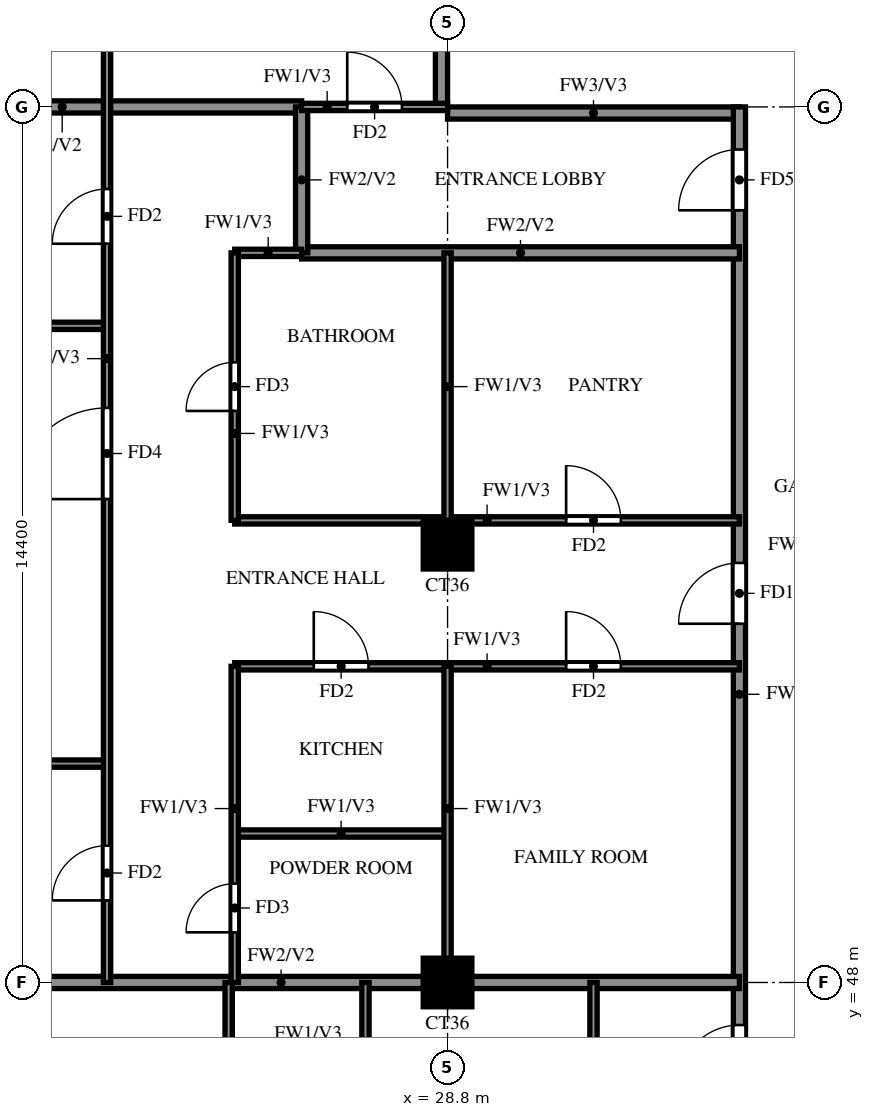
"""IFC4 building model, lengths in metres.
Left out: names, types, materials, properties, quantities, classifications, styles, units other than length and angle.
Written with IfcOpenShell. Run it as: python <this file> out.ifc"""

import sys

from ifc_helpers import new_model, si_unit, direction, frame, frame_2d, origin, origin_2d, place, context, subcontext, project, spatial, rectangle, extrude, source, transform, mapped, element, fill, save


model = new_model("IFC4")
c1 = context("Model", 3, precision=1e-05, world=origin(), true_north=direction((0.0, 1.0)))
c2 = subcontext(c1, "Body", "Model", "MODEL_VIEW")
j1 = project(units=[si_unit("LENGTHUNIT", "METRE"), si_unit("PLANEANGLEUNIT", "RADIAN")], contexts=[c1])
p1 = place(None, origin())
s1 = spatial("IfcSite", under=j1, at=p1, CompositionType="ELEMENT")
p2 = place(p1, origin())
s2 = spatial("IfcBuilding", under=s1, at=p2, CompositionType="ELEMENT")
p3 = place(p2, frame((0.0, 0.0, 243.0)))
s3 = spatial("IfcBuildingStorey", under=s2, at=p3, CompositionType="ELEMENT", Elevation=243.0)
m1 = source(origin(), c2, "Body", "SweptSolid", [
    extrude(rectangle(XDim=0.8, YDim=0.8, at=origin_2d()), origin(), (0.0, 0.0, 1.0), 3.22),
])
for number, where, z_axis, x_axis in (
    (1, (28.8, 48.0, 0.0), (0.0, 0.0, 1.0), (1.0, 0.0, 0.0)),
    (2, (28.8, 55.2, 0.0), (0.0, 0.0, 1.0), (1.0, 0.0, 0.0)),
):
    element("IfcColumn", number, at=place(p3, frame(where, z_axis=z_axis, x_axis=x_axis)), inside=s3, PredefinedType="COLUMN", context=c2, shape_type="MappedRepresentation", body=[
        mapped(m1, transform((0.0, 0.0, 0.0))),
    ])
p4 = place(p3, frame((28.8, 62.3, 0.0), z_axis=(0.0, 0.0, 1.0), x_axis=(1.0, 0.0, 0.0)))
e3 = element("IfcWall", 3, at=p4, inside=s3, PredefinedType="SOLIDWALL", context=c2, shape_type="SweptSolid", body=[
    extrude(rectangle(XDim=4.8, YDim=0.2, at=frame_2d((2.4, 0.0))), origin(), (0.0, 0.0, 1.0), 3.22),
])
p5 = place(p3, frame((28.7, 62.4, 0.0), z_axis=(0.0, 0.0, 1.0), x_axis=(0.0, 1.0, 0.0)))
e4 = element("IfcWall", 4, at=p5, inside=s3, PredefinedType="SOLIDWALL", context=c2, shape_type="SweptSolid", body=[
    extrude(rectangle(XDim=15.6, YDim=0.2, at=frame_2d((7.8, 0.0))), origin(), (0.0, 0.0, 1.0), 3.22),
])
p6 = place(p3, frame((33.6, 45.6, 0.0), z_axis=(0.0, 0.0, 1.0), x_axis=(0.0, 1.0, 0.0)))
e5 = element("IfcWall", 5, at=p6, inside=s3, PredefinedType="SOLIDWALL", context=c2, shape_type="SweptSolid", body=[
    extrude(rectangle(XDim=16.8, YDim=0.2, at=frame_2d((8.4, 0.0))), origin(), (0.0, 0.0, 1.0), 3.22),
])
p7 = place(p6, frame((0.7, 0.0, 0.0)))
e6 = element("IfcOpeningElement", 6, at=p7, cuts=e5, PredefinedType="OPENING", context=c2, shape_type="SweptSolid", body=[
    extrude(rectangle(XDim=1.0, YDim=2.1, at=frame_2d((0.5, 1.05))), frame((0.0, 0.11, 0.0), z_axis=(0.0, -1.0, 0.0), x_axis=(1.0, 0.0, 0.0)), (0.0, 0.0, 1.0), 0.22),
])
p8 = place(p6, frame((8.3, 0.0, 0.0)))
e7 = element("IfcOpeningElement", 7, at=p8, cuts=e5, PredefinedType="OPENING", context=c2, shape_type="SweptSolid", body=[
    extrude(rectangle(XDim=1.0, YDim=2.1, at=frame_2d((0.5, 1.05))), frame((0.0, 0.11, 0.0), z_axis=(0.0, -1.0, 0.0), x_axis=(1.0, 0.0, 0.0)), (0.0, 0.0, 1.0), 0.22),
])
p9 = place(p6, frame((15.1, 0.0, 0.0)))
e8 = element("IfcOpeningElement", 8, at=p9, cuts=e5, PredefinedType="OPENING", context=c2, shape_type="SweptSolid", body=[
    extrude(rectangle(XDim=1.0, YDim=2.1, at=frame_2d((0.5, 1.05))), frame((0.0, 0.11, 0.0), z_axis=(0.0, -1.0, 0.0), x_axis=(1.0, 0.0, 0.0)), (0.0, 0.0, 1.0), 0.22),
])
p10 = place(p3, frame((18.525, 48.0, 0.0), z_axis=(0.0, 0.0, 1.0), x_axis=(1.0, 0.0, 0.0)))
e9 = element("IfcWall", 9, at=p10, inside=s3, PredefinedType="SOLIDWALL", context=c2, shape_type="SweptSolid", body=[
    extrude(rectangle(XDim=15.075, YDim=0.2, at=frame_2d((7.538, 0.0))), origin(), (0.0, 0.0, 1.0), 3.22),
])
p11 = place(p3, frame((26.4, 60.0, 0.0), z_axis=(0.0, 0.0, 1.0), x_axis=(1.0, 0.0, 0.0)))
e10 = element("IfcWall", 10, at=p11, inside=s3, PredefinedType="SOLIDWALL", context=c2, shape_type="SweptSolid", body=[
    extrude(rectangle(XDim=7.2, YDim=0.2, at=frame_2d((3.6, 0.0))), origin(), (0.0, 0.0, 1.0), 3.22),
])
p12 = place(p3, frame((18.525, 62.4, 0.0), z_axis=(0.0, 0.0, 1.0), x_axis=(1.0, 0.0, 0.0)))
e11 = element("IfcWall", 11, at=p12, inside=s3, PredefinedType="SOLIDWALL", context=c2, shape_type="SweptSolid", body=[
    extrude(rectangle(XDim=7.875, YDim=0.2, at=frame_2d((3.938, 0.0))), origin(), (0.0, 0.0, 1.0), 3.22),
])
p13 = place(p3, frame((26.4, 60.0, 0.0), z_axis=(0.0, 0.0, 1.0), x_axis=(0.0, 1.0, 0.0)))
e12 = element("IfcWall", 12, at=p13, inside=s3, PredefinedType="SOLIDWALL", context=c2, shape_type="SweptSolid", body=[
    extrude(rectangle(XDim=2.4, YDim=0.2, at=frame_2d((1.2, 0.0))), origin(), (0.0, 0.0, 1.0), 3.22),
])
p14 = place(p3, frame((25.3, 50.45, 0.0), z_axis=(0.0, 0.0, 1.0), x_axis=(1.0, 0.0, 0.0)))
e13 = element("IfcWall", 13, at=p14, inside=s3, PredefinedType="PARTITIONING", context=c2, shape_type="SweptSolid", body=[
    extrude(rectangle(XDim=3.5, YDim=0.12, at=frame_2d((1.75, 0.0))), origin(), (0.0, 0.0, 1.0), 3.22),
])
p15 = place(p3, frame((18.525, 51.6, 0.0), z_axis=(0.0, 0.0, 1.0), x_axis=(1.0, 0.0, 0.0)))
e14 = element("IfcWall", 14, at=p15, inside=s3, PredefinedType="PARTITIONING", context=c2, shape_type="SweptSolid", body=[
    extrude(rectangle(XDim=4.675, YDim=0.12, at=frame_2d((2.337, 0.0))), origin(), (0.0, 0.0, 1.0), 2.32),
])
p16 = place(p3, frame((25.3, 53.2, 0.0), z_axis=(0.0, 0.0, 1.0), x_axis=(1.0, 0.0, 0.0)))
e15 = element("IfcWall", 15, at=p16, inside=s3, PredefinedType="PARTITIONING", context=c2, shape_type="SweptSolid", body=[
    extrude(rectangle(XDim=8.3, YDim=0.12, at=frame_2d((4.15, 0.0))), origin(), (0.0, 0.0, 1.0), 3.22),
])
p17 = place(p16, frame((1.3, 0.0, 0.0)))
e16 = element("IfcOpeningElement", 16, at=p17, cuts=e15, PredefinedType="OPENING", context=c2, shape_type="SweptSolid", body=[
    extrude(rectangle(XDim=0.9, YDim=2.1, at=frame_2d((0.45, 1.05))), frame((0.0, 0.07, 0.0), z_axis=(0.0, -1.0, 0.0), x_axis=(1.0, 0.0, 0.0)), (0.0, 0.0, 1.0), 0.14),
])
p18 = place(p16, frame((5.45, 0.0, 0.0)))
e17 = element("IfcOpeningElement", 17, at=p18, cuts=e15, PredefinedType="OPENING", context=c2, shape_type="SweptSolid", body=[
    extrude(rectangle(XDim=0.9, YDim=2.1, at=frame_2d((0.45, 1.05))), frame((0.0, 0.07, 0.0), z_axis=(0.0, -1.0, 0.0), x_axis=(1.0, 0.0, 0.0)), (0.0, 0.0, 1.0), 0.14),
])
p19 = place(p3, frame((25.3, 55.6, 0.0), z_axis=(0.0, 0.0, 1.0), x_axis=(1.0, 0.0, 0.0)))
e18 = element("IfcWall", 18, at=p19, inside=s3, PredefinedType="PARTITIONING", context=c2, shape_type="SweptSolid", body=[
    extrude(rectangle(XDim=8.3, YDim=0.12, at=frame_2d((4.15, 0.0))), origin(), (0.0, 0.0, 1.0), 3.22),
])
p20 = place(p19, frame((5.45, 0.0, 0.0)))
e19 = element("IfcOpeningElement", 19, at=p20, cuts=e18, PredefinedType="OPENING", context=c2, shape_type="SweptSolid", body=[
    extrude(rectangle(XDim=0.9, YDim=2.1, at=frame_2d((0.45, 1.05))), frame((0.0, 0.07, 0.0), z_axis=(0.0, -1.0, 0.0), x_axis=(1.0, 0.0, 0.0)), (0.0, 0.0, 1.0), 0.14),
])
p21 = place(p3, frame((18.525, 58.8, 0.0), z_axis=(0.0, 0.0, 1.0), x_axis=(1.0, 0.0, 0.0)))
e20 = element("IfcWall", 20, at=p21, inside=s3, PredefinedType="PARTITIONING", context=c2, shape_type="SweptSolid", body=[
    extrude(rectangle(XDim=4.675, YDim=0.12, at=frame_2d((2.337, 0.0))), origin(), (0.0, 0.0, 1.0), 2.32),
])
p22 = place(p3, frame((25.3, 60.0, 0.0), z_axis=(0.0, 0.0, 1.0), x_axis=(1.0, 0.0, 0.0)))
e21 = element("IfcWall", 21, at=p22, inside=s3, PredefinedType="PARTITIONING", context=c2, shape_type="SweptSolid", body=[
    extrude(rectangle(XDim=1.1, YDim=0.12, at=frame_2d((0.55, 0.0))), origin(), (0.0, 0.0, 1.0), 3.22),
])
p23 = place(p3, frame((26.4, 62.4, 0.0), z_axis=(0.0, 0.0, 1.0), x_axis=(1.0, 0.0, 0.0)))
e22 = element("IfcWall", 22, at=p23, inside=s3, PredefinedType="PARTITIONING", context=c2, shape_type="SweptSolid", body=[
    extrude(rectangle(XDim=2.4, YDim=0.12, at=frame_2d((1.2, 0.0))), origin(), (0.0, 0.0, 1.0), 3.22),
])
p24 = place(p23, frame((0.75, 0.0, 0.0)))
e23 = element("IfcOpeningElement", 23, at=p24, cuts=e22, PredefinedType="OPENING", context=c2, shape_type="SweptSolid", body=[
    extrude(rectangle(XDim=0.9, YDim=2.1, at=frame_2d((0.45, 1.05))), frame((0.0, 0.07, 0.0), z_axis=(0.0, -1.0, 0.0), x_axis=(1.0, 0.0, 0.0)), (0.0, 0.0, 1.0), 0.14),
])
p25 = place(p3, frame((23.2, 48.0, 0.0), z_axis=(0.0, 0.0, 1.0), x_axis=(0.0, 1.0, 0.0)))
e24 = element("IfcWall", 24, at=p25, inside=s3, PredefinedType="PARTITIONING", context=c2, shape_type="SweptSolid", body=[
    extrude(rectangle(XDim=21.6, YDim=0.12, at=frame_2d((10.8, 0.0))), origin(), (0.0, 0.0, 1.0), 3.22),
])
p26 = place(p25, frame((1.35, 0.0, 0.0)))
e25 = element("IfcOpeningElement", 25, at=p26, cuts=e24, PredefinedType="OPENING", context=c2, shape_type="SweptSolid", body=[
    extrude(rectangle(XDim=0.9, YDim=2.1, at=frame_2d((0.45, 1.05))), frame((0.0, 0.07, 0.0), z_axis=(0.0, -1.0, 0.0), x_axis=(1.0, 0.0, 0.0)), (0.0, 0.0, 1.0), 0.14),
])
p27 = place(p25, frame((7.95, 0.0, 0.0)))
e26 = element("IfcOpeningElement", 26, at=p27, cuts=e24, PredefinedType="OPENING", context=c2, shape_type="SweptSolid", body=[
    extrude(rectangle(XDim=1.5, YDim=2.1, at=frame_2d((0.75, 1.05))), frame((0.0, 0.07, 0.0), z_axis=(0.0, -1.0, 0.0), x_axis=(1.0, 0.0, 0.0)), (0.0, 0.0, 1.0), 0.14),
])
p28 = place(p25, frame((12.15, 0.0, 0.0)))
e27 = element("IfcOpeningElement", 27, at=p28, cuts=e24, PredefinedType="OPENING", context=c2, shape_type="SweptSolid", body=[
    extrude(rectangle(XDim=0.9, YDim=2.1, at=frame_2d((0.45, 1.05))), frame((0.0, 0.07, 0.0), z_axis=(0.0, -1.0, 0.0), x_axis=(1.0, 0.0, 0.0)), (0.0, 0.0, 1.0), 0.14),
])
p29 = place(p25, frame((15.75, 0.0, 0.0)))
e28 = element("IfcOpeningElement", 28, at=p29, cuts=e24, PredefinedType="OPENING", context=c2, shape_type="SweptSolid", body=[
    extrude(rectangle(XDim=0.9, YDim=2.1, at=frame_2d((0.45, 1.05))), frame((0.0, 0.07, 0.0), z_axis=(0.0, -1.0, 0.0), x_axis=(1.0, 0.0, 0.0)), (0.0, 0.0, 1.0), 0.14),
])
p30 = place(p25, frame((19.35, 0.0, 0.0)))
e29 = element("IfcOpeningElement", 29, at=p30, cuts=e24, PredefinedType="OPENING", context=c2, shape_type="SweptSolid", body=[
    extrude(rectangle(XDim=0.9, YDim=2.1, at=frame_2d((0.45, 1.05))), frame((0.0, 0.07, 0.0), z_axis=(0.0, -1.0, 0.0), x_axis=(1.0, 0.0, 0.0)), (0.0, 0.0, 1.0), 0.14),
])
p31 = place(p3, frame((25.2, 39.725, 0.0), z_axis=(0.0, 0.0, 1.0), x_axis=(0.0, 1.0, 0.0)))
e30 = element("IfcWall", 30, at=p31, inside=s3, PredefinedType="PARTITIONING", context=c2, shape_type="SweptSolid", body=[
    extrude(rectangle(XDim=8.275, YDim=0.12, at=frame_2d((4.137, 0.0))), origin(), (0.0, 0.0, 1.0), 3.22),
])
p32 = place(p31, frame((4.525, 0.0, 0.0)))
e31 = element("IfcOpeningElement", 31, at=p32, cuts=e30, PredefinedType="OPENING", context=c2, shape_type="SweptSolid", body=[
    extrude(rectangle(XDim=0.9, YDim=2.1, at=frame_2d((0.45, 1.05))), frame((0.0, 0.07, 0.0), z_axis=(0.0, -1.0, 0.0), x_axis=(1.0, 0.0, 0.0)), (0.0, 0.0, 1.0), 0.14),
])
p33 = place(p3, frame((25.3, 48.0, 0.0), z_axis=(0.0, 0.0, 1.0), x_axis=(0.0, 1.0, 0.0)))
e32 = element("IfcWall", 32, at=p33, inside=s3, PredefinedType="PARTITIONING", context=c2, shape_type="SweptSolid", body=[
    extrude(rectangle(XDim=5.2, YDim=0.12, at=frame_2d((2.6, 0.0))), origin(), (0.0, 0.0, 1.0), 3.22),
])
p34 = place(p33, frame((0.825, 0.0, 0.0)))
e33 = element("IfcOpeningElement", 33, at=p34, cuts=e32, PredefinedType="OPENING", context=c2, shape_type="SweptSolid", body=[
    extrude(rectangle(XDim=0.8, YDim=2.1, at=frame_2d((0.4, 1.05))), frame((0.0, 0.07, 0.0), z_axis=(0.0, -1.0, 0.0), x_axis=(1.0, 0.0, 0.0)), (0.0, 0.0, 1.0), 0.14),
])
p35 = place(p3, frame((25.3, 55.6, 0.0), z_axis=(0.0, 0.0, 1.0), x_axis=(0.0, 1.0, 0.0)))
e34 = element("IfcWall", 34, at=p35, inside=s3, PredefinedType="PARTITIONING", context=c2, shape_type="SweptSolid", body=[
    extrude(rectangle(XDim=4.4, YDim=0.12, at=frame_2d((2.2, 0.0))), origin(), (0.0, 0.0, 1.0), 3.22),
])
p36 = place(p35, frame((1.8, 0.0, 0.0)))
e35 = element("IfcOpeningElement", 35, at=p36, cuts=e34, PredefinedType="OPENING", context=c2, shape_type="SweptSolid", body=[
    extrude(rectangle(XDim=0.8, YDim=2.1, at=frame_2d((0.4, 1.05))), frame((0.0, 0.07, 0.0), z_axis=(0.0, -1.0, 0.0), x_axis=(1.0, 0.0, 0.0)), (0.0, 0.0, 1.0), 0.14),
])
p37 = place(p3, frame((27.45, 45.6, 0.0), z_axis=(0.0, 0.0, 1.0), x_axis=(0.0, 1.0, 0.0)))
e36 = element("IfcWall", 36, at=p37, inside=s3, PredefinedType="PARTITIONING", context=c2, shape_type="SweptSolid", body=[
    extrude(rectangle(XDim=2.4, YDim=0.12, at=frame_2d((1.2, 0.0))), origin(), (0.0, 0.0, 1.0), 3.22),
])
p38 = place(p3, frame((28.8, 48.0, 0.0), z_axis=(0.0, 0.0, 1.0), x_axis=(0.0, 1.0, 0.0)))
e37 = element("IfcWall", 37, at=p38, inside=s3, PredefinedType="PARTITIONING", context=c2, shape_type="SweptSolid", body=[
    extrude(rectangle(XDim=5.2, YDim=0.12, at=frame_2d((2.6, 0.0))), origin(), (0.0, 0.0, 1.0), 3.22),
])
p39 = place(p3, frame((28.8, 55.6, 0.0), z_axis=(0.0, 0.0, 1.0), x_axis=(0.0, 1.0, 0.0)))
e38 = element("IfcWall", 38, at=p39, inside=s3, PredefinedType="PARTITIONING", context=c2, shape_type="SweptSolid", body=[
    extrude(rectangle(XDim=4.4, YDim=0.12, at=frame_2d((2.2, 0.0))), origin(), (0.0, 0.0, 1.0), 3.22),
])
p40 = place(p3, frame((31.2, 45.6, 0.0), z_axis=(0.0, 0.0, 1.0), x_axis=(0.0, 1.0, 0.0)))
e39 = element("IfcWall", 39, at=p40, inside=s3, PredefinedType="PARTITIONING", context=c2, shape_type="SweptSolid", body=[
    extrude(rectangle(XDim=2.4, YDim=0.12, at=frame_2d((1.2, 0.0))), origin(), (0.0, 0.0, 1.0), 3.22),
])
p41 = place(p7, origin())
e40 = element("IfcDoor", 40, at=p41, inside=s3, OperationType="SINGLE_SWING_LEFT", PredefinedType="DOOR", context=c2, shape_type="SweptSolid", body=[
    extrude(rectangle(XDim=1.0, YDim=2.1, at=frame_2d((0.5, 1.05))), frame((0.0, 0.025, 0.0), z_axis=(0.0, -1.0, 0.0), x_axis=(1.0, 0.0, 0.0)), (0.0, 0.0, 1.0), 0.05),
])
fill(e6, e40)
p42 = place(p8, origin())
e41 = element("IfcDoor", 41, at=p42, inside=s3, OperationType="SINGLE_SWING_RIGHT", PredefinedType="DOOR", context=c2, shape_type="SweptSolid", body=[
    extrude(rectangle(XDim=1.0, YDim=2.1, at=frame_2d((0.5, 1.05))), frame((0.0, 0.025, 0.0), z_axis=(0.0, -1.0, 0.0), x_axis=(1.0, 0.0, 0.0)), (0.0, 0.0, 1.0), 0.05),
])
fill(e7, e41)
p43 = place(p26, origin())
e42 = element("IfcDoor", 42, at=p43, inside=s3, OperationType="SINGLE_SWING_LEFT", PredefinedType="DOOR", context=c2, shape_type="SweptSolid", body=[
    extrude(rectangle(XDim=0.9, YDim=2.1, at=frame_2d((0.45, 1.05))), frame((0.0, 0.025, 0.0), z_axis=(0.0, -1.0, 0.0), x_axis=(1.0, 0.0, 0.0)), (0.0, 0.0, 1.0), 0.05),
])
fill(e25, e42)
p44 = place(p27, origin())
e43 = element("IfcDoor", 43, at=p44, inside=s3, OperationType="SINGLE_SWING_RIGHT", PredefinedType="DOOR", context=c2, shape_type="SweptSolid", body=[
    extrude(rectangle(XDim=1.5, YDim=2.1, at=frame_2d((0.75, 1.05))), frame((0.0, 0.025, 0.0), z_axis=(0.0, -1.0, 0.0), x_axis=(1.0, 0.0, 0.0)), (0.0, 0.0, 1.0), 0.05),
])
fill(e26, e43)
p45 = place(p28, origin())
e44 = element("IfcDoor", 44, at=p45, inside=s3, OperationType="SINGLE_SWING_RIGHT", PredefinedType="DOOR", context=c2, shape_type="SweptSolid", body=[
    extrude(rectangle(XDim=0.9, YDim=2.1, at=frame_2d((0.45, 1.05))), frame((0.0, 0.025, 0.0), z_axis=(0.0, -1.0, 0.0), x_axis=(1.0, 0.0, 0.0)), (0.0, 0.0, 1.0), 0.05),
])
fill(e27, e44)
p46 = place(p34, origin())
e45 = element("IfcDoor", 45, at=p46, inside=s3, OperationType="SINGLE_SWING_LEFT", PredefinedType="DOOR", context=c2, shape_type="SweptSolid", body=[
    extrude(rectangle(XDim=0.8, YDim=2.1, at=frame_2d((0.4, 1.05))), frame((0.0, 0.025, 0.0), z_axis=(0.0, -1.0, 0.0), x_axis=(1.0, 0.0, 0.0)), (0.0, 0.0, 1.0), 0.05),
])
fill(e33, e45)
p47 = place(p17, origin())
e46 = element("IfcDoor", 46, at=p47, inside=s3, OperationType="SINGLE_SWING_LEFT", PredefinedType="DOOR", context=c2, shape_type="SweptSolid", body=[
    extrude(rectangle(XDim=0.9, YDim=2.1, at=frame_2d((0.45, 1.05))), frame((0.0, 0.025, 0.0), z_axis=(0.0, -1.0, 0.0), x_axis=(1.0, 0.0, 0.0)), (0.0, 0.0, 1.0), 0.05),
])
fill(e16, e46)
p48 = place(p36, origin())
e47 = element("IfcDoor", 47, at=p48, inside=s3, OperationType="SINGLE_SWING_RIGHT", PredefinedType="DOOR", context=c2, shape_type="SweptSolid", body=[
    extrude(rectangle(XDim=0.8, YDim=2.1, at=frame_2d((0.4, 1.05))), frame((0.0, 0.025, 0.0), z_axis=(0.0, -1.0, 0.0), x_axis=(1.0, 0.0, 0.0)), (0.0, 0.0, 1.0), 0.05),
])
fill(e35, e47)
p49 = place(p18, origin())
e48 = element("IfcDoor", 48, at=p49, inside=s3, OperationType="SINGLE_SWING_LEFT", PredefinedType="DOOR", context=c2, shape_type="SweptSolid", body=[
    extrude(rectangle(XDim=0.9, YDim=2.1, at=frame_2d((0.45, 1.05))), frame((0.0, 0.025, 0.0), z_axis=(0.0, -1.0, 0.0), x_axis=(1.0, 0.0, 0.0)), (0.0, 0.0, 1.0), 0.05),
])
fill(e17, e48)
p50 = place(p20, origin())
e49 = element("IfcDoor", 49, at=p50, inside=s3, OperationType="SINGLE_SWING_LEFT", PredefinedType="DOOR", context=c2, shape_type="SweptSolid", body=[
    extrude(rectangle(XDim=0.9, YDim=2.1, at=frame_2d((0.45, 1.05))), frame((0.0, 0.025, 0.0), z_axis=(0.0, -1.0, 0.0), x_axis=(1.0, 0.0, 0.0)), (0.0, 0.0, 1.0), 0.05),
])
fill(e19, e49)
p51 = place(p24, origin())
e50 = element("IfcDoor", 50, at=p51, inside=s3, OperationType="SINGLE_SWING_RIGHT", PredefinedType="DOOR", context=c2, shape_type="SweptSolid", body=[
    extrude(rectangle(XDim=0.9, YDim=2.1, at=frame_2d((0.45, 1.05))), frame((0.0, 0.025, 0.0), z_axis=(0.0, -1.0, 0.0), x_axis=(1.0, 0.0, 0.0)), (0.0, 0.0, 1.0), 0.05),
])
fill(e23, e50)
p52 = place(p9, origin())
e51 = element("IfcDoor", 51, at=p52, inside=s3, OperationType="SINGLE_SWING_LEFT", PredefinedType="DOOR", context=c2, shape_type="SweptSolid", body=[
    extrude(rectangle(XDim=1.0, YDim=2.1, at=frame_2d((0.5, 1.05))), frame((0.0, 0.025, 0.0), z_axis=(0.0, -1.0, 0.0), x_axis=(1.0, 0.0, 0.0)), (0.0, 0.0, 1.0), 0.05),
])
fill(e8, e51)
save(model, sys.argv[1])
